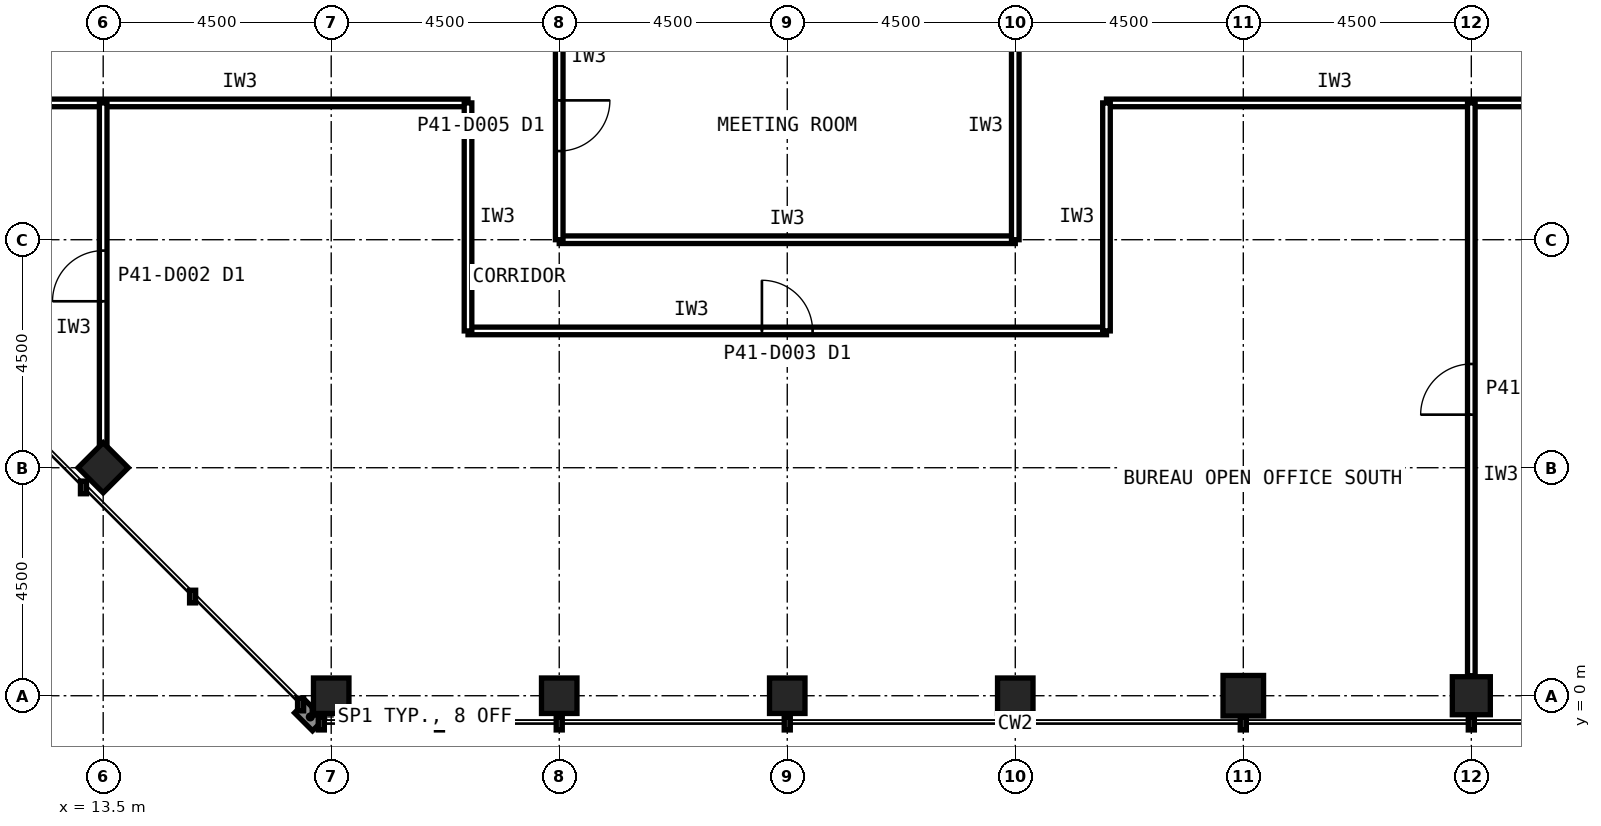
"""IFC4 building model, lengths in metres.
Left out: names, types, materials, properties, quantities, classifications, styles, units other than length and angle.
Written with IfcOpenShell. Run it as: python <this file> out.ifc"""

import sys

from ifc_helpers import new_model, si_unit, direction, frame, frame_2d, origin, origin_2d, place, context, subcontext, project, spatial, rectangle, hollow_rectangle, extrude, element, fill, save


model = new_model("IFC4")
c1 = context("Model", 3, precision=1e-05, world=origin(), true_north=direction((0.0, 1.0)))
c2 = subcontext(c1, "Body", "Model", "MODEL_VIEW")
j1 = project(units=[si_unit("LENGTHUNIT", "METRE"), si_unit("PLANEANGLEUNIT", "RADIAN")], contexts=[c1])
p1 = place(None, origin())
s1 = spatial("IfcSite", under=j1, at=p1, CompositionType="ELEMENT")
p2 = place(p1, origin())
s2 = spatial("IfcBuilding", under=s1, at=p2, CompositionType="ELEMENT")
p3 = place(p2, frame((0.0, 0.0, 175.6)))
s3 = spatial("IfcBuildingStorey", under=s2, at=p3, CompositionType="ELEMENT", Elevation=175.6)
for number, where, z_axis, x_axis in (
    (1, (18.0, 0.0, 0.0), (0.0, 0.0, 1.0), (1.0, 0.0, 0.0)),
    (2, (22.5, 0.0, 0.0), (0.0, 0.0, 1.0), (1.0, 0.0, 0.0)),
    (3, (27.0, 0.0, 0.0), (0.0, 0.0, 1.0), (1.0, 0.0, 0.0)),
    (4, (31.5, 0.0, 0.0), (0.0, 0.0, 1.0), (1.0, 0.0, 0.0)),
):
    element("IfcColumn", number, at=place(p3, frame(where, z_axis=z_axis, x_axis=x_axis)), inside=s3, PredefinedType="COLUMN", context=c2, shape_type="SweptSolid", body=[
        extrude(hollow_rectangle(XDim=0.7, YDim=0.7, WallThickness=0.036, at=origin_2d()), origin(), (0.0, 0.0, 1.0), 4.0),
    ])
p4 = place(p3, frame((36.0, 0.0, 0.0), z_axis=(0.0, 0.0, 1.0), x_axis=(1.0, 0.0, 0.0)))
e5 = element("IfcColumn", 5, at=p4, inside=s3, PredefinedType="COLUMN", context=c2, shape_type="SweptSolid", body=[
    extrude(hollow_rectangle(XDim=0.8, YDim=0.8, WallThickness=0.045, at=origin_2d()), origin(), (0.0, 0.0, 1.0), 4.0),
])
p5 = place(p3, frame((40.5, 0.0, 0.0), z_axis=(0.0, 0.0, 1.0), x_axis=(1.0, 0.0, 0.0)))
e6 = element("IfcColumn", 6, at=p5, inside=s3, PredefinedType="COLUMN", context=c2, shape_type="SweptSolid", body=[
    extrude(hollow_rectangle(XDim=0.75, YDim=0.75, WallThickness=0.04, at=origin_2d()), origin(), (0.0, 0.0, 1.0), 4.0),
])
p6 = place(p3, frame((13.5, 4.5, 0.0), z_axis=(0.0, 0.0, 1.0), x_axis=(0.707106781187, 0.707106781187, 0.0)))
e7 = element("IfcColumn", 7, at=p6, inside=s3, PredefinedType="COLUMN", context=c2, shape_type="SweptSolid", body=[
    extrude(hollow_rectangle(XDim=0.7, YDim=0.7, WallThickness=0.036, at=origin_2d()), origin(), (0.0, 0.0, 1.0), 4.0),
])
p7 = place(p3, frame((20.7, 7.2, 0.0), z_axis=(0.0, 0.0, 1.0), x_axis=(1.0, 0.0, 0.0)))
e8 = element("IfcWall", 8, at=p7, inside=s3, PredefinedType="PARTITIONING", context=c2, shape_type="SweptSolid", body=[
    extrude(rectangle(XDim=12.6, YDim=0.15, at=frame_2d((6.3, 0.0))), origin(), (0.0, 0.0, 1.0), 3.84),
])
p8 = place(p7, frame((5.8, 0.0, 0.0)))
e9 = element("IfcOpeningElement", 9, at=p8, cuts=e8, PredefinedType="OPENING", context=c2, shape_type="SweptSolid", body=[
    extrude(rectangle(XDim=1.0, YDim=2.1, at=frame_2d((0.5, 1.05))), frame((0.0, 0.085, 0.0), z_axis=(0.0, -1.0, 0.0), x_axis=(1.0, 0.0, 0.0)), (0.0, 0.0, 1.0), 0.17),
])
for number, where, z_axis, x_axis in (
    (10, (11.7, 11.7, 0.0), (0.0, 0.0, 1.0), (1.0, 0.0, 0.0)),
    (11, (33.3, 11.7, 0.0), (0.0, 0.0, 1.0), (1.0, 0.0, 0.0)),
):
    element("IfcWall", number, at=place(p3, frame(where, z_axis=z_axis, x_axis=x_axis)), inside=s3, PredefinedType="PARTITIONING", context=c2, shape_type="SweptSolid", body=[
        extrude(rectangle(XDim=9.0, YDim=0.15, at=frame_2d((4.5, 0.0))), origin(), (0.0, 0.0, 1.0), 3.84),
    ])
for number, where, z_axis, x_axis in (
    (12, (20.7, 11.7, 0.0), (0.0, 0.0, 1.0), (0.0, -1.0, 0.0)),
    (13, (33.3, 7.2, 0.0), (0.0, 0.0, 1.0), (0.0, 1.0, 0.0)),
):
    element("IfcWall", number, at=place(p3, frame(where, z_axis=z_axis, x_axis=x_axis)), inside=s3, PredefinedType="PARTITIONING", context=c2, shape_type="SweptSolid", body=[
        extrude(rectangle(XDim=4.5, YDim=0.15, at=frame_2d((2.25, 0.0))), origin(), (0.0, 0.0, 1.0), 3.84),
    ])
p9 = place(p3, frame((22.5, 9.0, 0.0), z_axis=(0.0, 0.0, 1.0), x_axis=(1.0, 0.0, 0.0)))
e14 = element("IfcWall", 14, at=p9, inside=s3, PredefinedType="PARTITIONING", context=c2, shape_type="SweptSolid", body=[
    extrude(rectangle(XDim=9.0, YDim=0.15, at=frame_2d((4.5, 0.0))), origin(), (0.0, 0.0, 1.0), 3.84),
])
p10 = place(p3, frame((31.5, 9.0, 0.0), z_axis=(0.0, 0.0, 1.0), x_axis=(0.0, 1.0, 0.0)))
e15 = element("IfcWall", 15, at=p10, inside=s3, PredefinedType="PARTITIONING", context=c2, shape_type="SweptSolid", body=[
    extrude(rectangle(XDim=4.5, YDim=0.15, at=frame_2d((2.25, 0.0))), origin(), (0.0, 0.0, 1.0), 2.989),
])
p11 = place(p3, frame((22.5, 13.5, 0.0), z_axis=(0.0, 0.0, 1.0), x_axis=(0.0, -1.0, 0.0)))
e16 = element("IfcWall", 16, at=p11, inside=s3, PredefinedType="PARTITIONING", context=c2, shape_type="SweptSolid", body=[
    extrude(rectangle(XDim=4.5, YDim=0.15, at=frame_2d((2.25, 0.0))), origin(), (0.0, 0.0, 1.0), 2.989),
])
p12 = place(p11, frame((1.75, 0.0, 0.0)))
e17 = element("IfcOpeningElement", 17, at=p12, cuts=e16, PredefinedType="OPENING", context=c2, shape_type="SweptSolid", body=[
    extrude(rectangle(XDim=1.0, YDim=2.1, at=frame_2d((0.5, 1.05))), frame((0.0, 0.085, 0.0), z_axis=(0.0, -1.0, 0.0), x_axis=(1.0, 0.0, 0.0)), (0.0, 0.0, 1.0), 0.17),
])
p13 = place(p3, frame((40.5, 0.395, 0.0), z_axis=(0.0, 0.0, 1.0), x_axis=(0.0, 1.0, 0.0)))
e18 = element("IfcWall", 18, at=p13, inside=s3, PredefinedType="PARTITIONING", context=c2, shape_type="SweptSolid", body=[
    extrude(rectangle(XDim=11.305, YDim=0.15, at=frame_2d((5.652, 0.0))), origin(), (0.0, 0.0, 1.0), 2.989),
])
p14 = place(p13, frame((5.153, 0.0, 0.0)))
e19 = element("IfcOpeningElement", 19, at=p14, cuts=e18, PredefinedType="OPENING", context=c2, shape_type="SweptSolid", body=[
    extrude(rectangle(XDim=1.0, YDim=2.1, at=frame_2d((0.5, 1.05))), frame((0.0, 0.085, 0.0), z_axis=(0.0, -1.0, 0.0), x_axis=(1.0, 0.0, 0.0)), (0.0, 0.0, 1.0), 0.17),
])
p15 = place(p3, frame((13.5, 4.87, 0.0), z_axis=(0.0, 0.0, 1.0), x_axis=(0.0, 1.0, 0.0)))
e20 = element("IfcWall", 20, at=p15, inside=s3, PredefinedType="PARTITIONING", context=c2, shape_type="SweptSolid", body=[
    extrude(rectangle(XDim=6.83, YDim=0.15, at=frame_2d((3.415, 0.0))), origin(), (0.0, 0.0, 1.0), 2.989),
])
p16 = place(p15, frame((2.915, 0.0, 0.0)))
e21 = element("IfcOpeningElement", 21, at=p16, cuts=e20, PredefinedType="OPENING", context=c2, shape_type="SweptSolid", body=[
    extrude(rectangle(XDim=1.0, YDim=2.1, at=frame_2d((0.5, 1.05))), frame((0.0, 0.085, 0.0), z_axis=(0.0, -1.0, 0.0), x_axis=(1.0, 0.0, 0.0)), (0.0, 0.0, 1.0), 0.17),
])
p17 = place(p8, origin())
e22 = element("IfcDoor", 22, at=p17, inside=s3, OperationType="SINGLE_SWING_LEFT", PredefinedType="DOOR", context=c2, shape_type="SweptSolid", body=[
    extrude(rectangle(XDim=1.0, YDim=2.1, at=frame_2d((0.5, 1.05))), frame((0.0, 0.025, 0.0), z_axis=(0.0, -1.0, 0.0), x_axis=(1.0, 0.0, 0.0)), (0.0, 0.0, 1.0), 0.05),
])
fill(e9, e22)
p18 = place(p12, origin())
e23 = element("IfcDoor", 23, at=p18, inside=s3, OperationType="SINGLE_SWING_LEFT", PredefinedType="DOOR", context=c2, shape_type="SweptSolid", body=[
    extrude(rectangle(XDim=1.0, YDim=2.1, at=frame_2d((0.5, 1.05))), frame((0.0, 0.025, 0.0), z_axis=(0.0, -1.0, 0.0), x_axis=(1.0, 0.0, 0.0)), (0.0, 0.0, 1.0), 0.05),
])
fill(e17, e23)
p19 = place(p14, origin())
e24 = element("IfcDoor", 24, at=p19, inside=s3, OperationType="SINGLE_SWING_LEFT", PredefinedType="DOOR", context=c2, shape_type="SweptSolid", body=[
    extrude(rectangle(XDim=1.0, YDim=2.1, at=frame_2d((0.5, 1.05))), frame((0.0, 0.025, 0.0), z_axis=(0.0, -1.0, 0.0), x_axis=(1.0, 0.0, 0.0)), (0.0, 0.0, 1.0), 0.05),
])
fill(e19, e24)
p20 = place(p16, origin())
e25 = element("IfcDoor", 25, at=p20, inside=s3, OperationType="SINGLE_SWING_LEFT", PredefinedType="DOOR", context=c2, shape_type="SweptSolid", body=[
    extrude(rectangle(XDim=1.0, YDim=2.1, at=frame_2d((0.5, 1.05))), frame((0.0, 0.025, 0.0), z_axis=(0.0, -1.0, 0.0), x_axis=(1.0, 0.0, 0.0)), (0.0, 0.0, 1.0), 0.05),
])
fill(e21, e25)
save(model, sys.argv[1])
